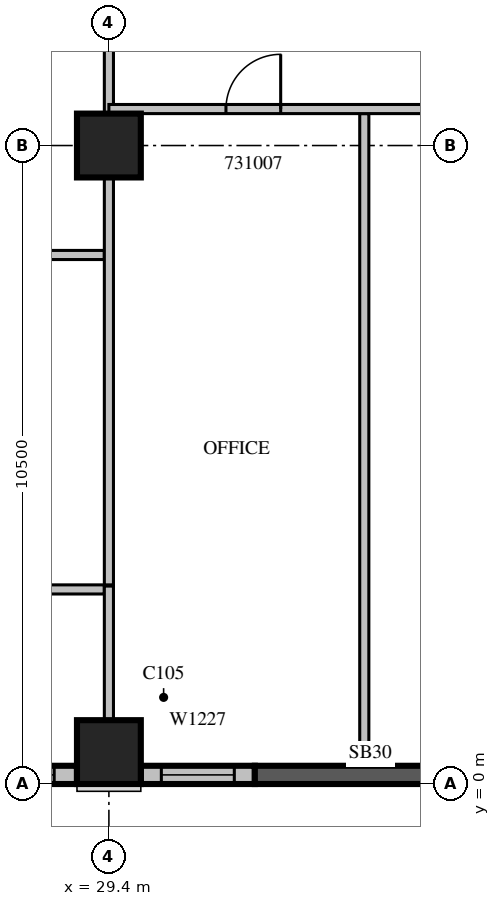
"""IFC4 building model, lengths in metres.
Left out: names, types, materials, properties, quantities, classifications, styles, units other than length and angle.
Written with IfcOpenShell. Run it as: python <this file> out.ifc"""

import sys

from ifc_helpers import new_model, si_unit, direction, frame, frame_2d, origin, origin_2d, place, context, subcontext, project, spatial, rectangle, extrude, source, transform, mapped, element, fill, save


model = new_model("IFC4")
c1 = context("Model", 3, precision=1e-05, world=origin(), true_north=direction((0.0, 1.0)))
c2 = subcontext(c1, "Body", "Model", "MODEL_VIEW")
j1 = project(units=[si_unit("LENGTHUNIT", "METRE"), si_unit("PLANEANGLEUNIT", "RADIAN")], contexts=[c1])
p1 = place(None, origin())
s1 = spatial("IfcSite", under=j1, at=p1, CompositionType="ELEMENT")
p2 = place(p1, origin())
s2 = spatial("IfcBuilding", under=s1, at=p2, CompositionType="ELEMENT")
p3 = place(p2, frame((0.0, 0.0, 141.3)))
s3 = spatial("IfcBuildingStorey", under=s2, at=p3, CompositionType="ELEMENT", Elevation=141.3)
m1 = source(origin(), c2, "Body", "SweptSolid", [
    extrude(rectangle(XDim=1.05, YDim=1.05, at=origin_2d()), origin(), (0.0, 0.0, 1.0), 4.2),
])
for number, where, z_axis, x_axis in (
    (1, (29.4, 0.525, 0.0), (0.0, 0.0, 1.0), (1.0, 0.0, 0.0)),
    (2, (29.4, 10.5, 0.0), (0.0, 0.0, 1.0), (1.0, 0.0, 0.0)),
):
    element("IfcColumn", number, at=place(p3, frame(where, z_axis=z_axis, x_axis=x_axis)), inside=s3, PredefinedType="COLUMN", context=c2, shape_type="MappedRepresentation", body=[
        mapped(m1, transform((0.0, 0.0, 0.0), scale=1.0)),
    ])
m2 = source(origin(), c2, "Body", "SweptSolid", [
    extrude(rectangle(XDim=7.35, YDim=0.3, at=frame_2d((3.675, 0.0))), origin(), (0.0, 0.0, 1.0), 3.8),
])
p4 = place(p3, frame((21.525, 0.15, 0.0), z_axis=(0.0, 0.0, 1.0), x_axis=(1.0, 0.0, 0.0)))
e3 = element("IfcWall", 3, at=p4, inside=s3, PredefinedType="STANDARD", context=c2, shape_type="MappedRepresentation", body=[
    mapped(m2, transform((0.0, 0.0, 0.0), scale=1.0)),
])
m3 = source(origin(), c2, "Body", "SweptSolid", [
    extrude(rectangle(XDim=2.4, YDim=2.7, at=frame_2d((1.2, 1.35))), frame((0.0, 0.16, 0.0), z_axis=(0.0, -1.0, 0.0), x_axis=(1.0, 0.0, 0.0)), (0.0, 0.0, 1.0), 0.32),
])
p5 = place(p4, frame((0.375, 0.0, 0.6)))
e4 = element("IfcOpeningElement", 4, at=p5, cuts=e3, PredefinedType="OPENING", context=c2, shape_type="MappedRepresentation", body=[
    mapped(m3, transform((0.0, 0.0, 0.0), scale=1.0)),
])
p6 = place(p4, frame((4.575, 0.0, 0.6)))
e5 = element("IfcOpeningElement", 5, at=p6, cuts=e3, PredefinedType="OPENING", context=c2, shape_type="MappedRepresentation", body=[
    mapped(m3, transform((0.0, 0.0, 0.0), scale=1.0)),
])
m4 = source(origin(), c2, "Body", "SweptSolid", [
    extrude(rectangle(XDim=1.875, YDim=0.3, at=frame_2d((0.938, 0.0))), origin(), (0.0, 0.0, 1.0), 3.8),
])
p7 = place(p3, frame((29.925, 0.15, 0.0), z_axis=(0.0, 0.0, 1.0), x_axis=(1.0, 0.0, 0.0)))
e6 = element("IfcWall", 6, at=p7, inside=s3, PredefinedType="STANDARD", context=c2, shape_type="MappedRepresentation", body=[
    mapped(m4, transform((0.0, 0.0, 0.0), scale=1.0)),
])
m5 = source(origin(), c2, "Body", "SweptSolid", [
    extrude(rectangle(XDim=1.2, YDim=2.7, at=frame_2d((0.6, 1.35))), frame((0.0, 0.16, 0.0), z_axis=(0.0, -1.0, 0.0), x_axis=(1.0, 0.0, 0.0)), (0.0, 0.0, 1.0), 0.32),
])
p8 = place(p7, frame((0.338, 0.0, 0.6)))
e7 = element("IfcOpeningElement", 7, at=p8, cuts=e6, PredefinedType="OPENING", context=c2, shape_type="MappedRepresentation", body=[
    mapped(m5, transform((0.0, 0.0, 0.0), scale=1.0)),
])
m6 = source(origin(), c2, "Body", "SweptSolid", [
    extrude(rectangle(XDim=3.8, YDim=0.3, at=frame_2d((1.9, 0.0))), origin(), (0.0, 0.0, 1.0), 3.8),
])
p9 = place(p3, frame((31.8, 0.15, 0.0), z_axis=(0.0, 0.0, 1.0), x_axis=(1.0, 0.0, 0.0)))
e8 = element("IfcWall", 8, at=p9, inside=s3, PredefinedType="SOLIDWALL", context=c2, shape_type="MappedRepresentation", body=[
    mapped(m6, transform((0.0, 0.0, 0.0), scale=1.0)),
])
p10 = place(p3, frame((29.325, 8.7, 0.0), z_axis=(0.0, 0.0, 1.0), x_axis=(-1.0, 0.0, 0.0)))
e9 = element("IfcWall", 9, at=p10, inside=s3, PredefinedType="PARTITIONING", context=c2, shape_type="SweptSolid", body=[
    extrude(rectangle(XDim=5.35, YDim=0.15, at=frame_2d((2.675, 0.0))), origin(), (0.0, 0.0, 1.0), 3.8),
])
m7 = source(origin(), c2, "Body", "SweptSolid", [
    extrude(rectangle(XDim=6.701, YDim=0.15, at=frame_2d((3.35, 0.0))), origin(), (0.0, 0.0, 1.0), 3.8),
])
p11 = place(p3, frame((29.4, 3.275, 0.0), z_axis=(0.0, 0.0, 1.0), x_axis=(0.0, 1.0, 0.0)))
e10 = element("IfcWall", 10, at=p11, inside=s3, PredefinedType="PARTITIONING", context=c2, shape_type="MappedRepresentation", body=[
    mapped(m7, transform((0.0, 0.0, 0.0), scale=1.0)),
])
m8 = source(origin(), c2, "Body", "SweptSolid", [
    extrude(rectangle(XDim=3.976, YDim=0.15, at=frame_2d((1.988, 0.0))), origin(), (0.0, 0.0, 1.0), 3.8),
])
p12 = place(p3, frame((29.4, 11.024, 0.0), z_axis=(0.0, 0.0, 1.0), x_axis=(0.0, 1.0, 0.0)))
e11 = element("IfcWall", 11, at=p12, inside=s3, PredefinedType="PARTITIONING", context=c2, shape_type="MappedRepresentation", body=[
    mapped(m8, transform((0.0, 0.0, 0.0), scale=1.0)),
])
m9 = source(origin(), c2, "Body", "SweptSolid", [
    extrude(rectangle(XDim=7.325, YDim=0.15, at=frame_2d((3.663, 0.0))), origin(), (0.0, 0.0, 1.0), 3.8),
])
p13 = place(p3, frame((22.0, 3.2, 0.0), z_axis=(0.0, 0.0, 1.0), x_axis=(1.0, 0.0, 0.0)))
e12 = element("IfcWall", 12, at=p13, inside=s3, PredefinedType="PARTITIONING", context=c2, shape_type="MappedRepresentation", body=[
    mapped(m9, transform((0.0, 0.0, 0.0), scale=1.0)),
])
m10 = source(origin(), c2, "Body", "SweptSolid", [
    extrude(rectangle(XDim=1.0, YDim=2.1, at=frame_2d((0.5, 1.05))), frame((0.0, 0.085, 0.0), z_axis=(0.0, -1.0, 0.0), x_axis=(1.0, 0.0, 0.0)), (0.0, 0.0, 1.0), 0.17),
])
p14 = place(p13, frame((3.2, 0.0, 0.0)))
e13 = element("IfcOpeningElement", 13, at=p14, cuts=e12, PredefinedType="OPENING", context=c2, shape_type="MappedRepresentation", body=[
    mapped(m10, transform((0.0, 0.0, 0.0), scale=1.0)),
])
m11 = source(origin(), c2, "Body", "SweptSolid", [
    extrude(rectangle(XDim=0.9, YDim=2.1, at=frame_2d((0.45, 1.05))), frame((0.0, 0.085, 0.0), z_axis=(0.0, -1.0, 0.0), x_axis=(1.0, 0.0, 0.0)), (0.0, 0.0, 1.0), 0.17),
])
p15 = place(p13, frame((2.213, 0.0, 0.0)))
e14 = element("IfcOpeningElement", 14, at=p15, cuts=e12, PredefinedType="OPENING", context=c2, shape_type="MappedRepresentation", body=[
    mapped(m11, transform((0.0, 0.0, 0.0), scale=1.0)),
])
m12 = source(origin(), c2, "Body", "SweptSolid", [
    extrude(rectangle(XDim=10.725, YDim=0.15, at=frame_2d((5.362, 0.0))), origin(), (0.0, 0.0, 1.0), 3.8),
])
p16 = place(p3, frame((33.6, 0.3, 0.0), z_axis=(0.0, 0.0, 1.0), x_axis=(0.0, 1.0, 0.0)))
e15 = element("IfcWall", 15, at=p16, inside=s3, PredefinedType="PARTITIONING", context=c2, shape_type="MappedRepresentation", body=[
    mapped(m12, transform((0.0, 0.0, 0.0), scale=1.0)),
])
m13 = source(origin(), c2, "Body", "SweptSolid", [
    extrude(rectangle(XDim=2.206, YDim=0.15, at=frame_2d((1.103, 0.0))), origin(), (0.0, 0.0, 1.0), 3.8),
])
p17 = place(p3, frame((29.4, 1.049, 0.0), z_axis=(0.0, 0.0, 1.0), x_axis=(0.0, 1.0, 0.0)))
e16 = element("IfcWall", 16, at=p17, inside=s3, PredefinedType="PARTITIONING", context=c2, shape_type="MappedRepresentation", body=[
    mapped(m13, transform((0.0, 0.0, 0.0), scale=1.0)),
])
m14 = source(origin(), c2, "Body", "SweptSolid", [
    extrude(rectangle(XDim=8.4, YDim=0.15, at=frame_2d((4.2, 0.0))), origin(), (0.0, 0.0, 1.0), 3.8),
])
p18 = place(p3, frame((37.8, 11.1, 0.0), z_axis=(0.0, 0.0, 1.0), x_axis=(-1.0, 0.0, 0.0)))
e17 = element("IfcWall", 17, at=p18, inside=s3, PredefinedType="PARTITIONING", context=c2, shape_type="MappedRepresentation", body=[
    mapped(m14, transform((0.0, 0.0, 0.0), scale=1.0)),
])
p19 = place(p18, frame((5.575, 0.0, 0.0)))
e18 = element("IfcOpeningElement", 18, at=p19, cuts=e17, PredefinedType="OPENING", context=c2, shape_type="MappedRepresentation", body=[
    mapped(m11, transform((0.0, 0.0, 0.0), scale=1.0)),
])
p20 = place(p18, frame((1.875, 0.0, 0.0)))
e19 = element("IfcOpeningElement", 19, at=p20, cuts=e17, PredefinedType="OPENING", context=c2, shape_type="MappedRepresentation", body=[
    mapped(m11, transform((0.0, 0.0, 0.0), scale=1.0)),
])
m15 = source(origin(), c2, "Body", "SweptSolid", [
    extrude(rectangle(XDim=2.4, YDim=2.7, at=frame_2d((1.2, 1.35))), frame((0.0, 0.03, 0.0), z_axis=(0.0, -1.0, 0.0), x_axis=(1.0, 0.0, 0.0)), (0.0, 0.0, 1.0), 0.06),
])
p21 = place(p6, origin())
e20 = element("IfcWindow", 20, at=p21, inside=s3, PartitioningType="SINGLE_PANEL", PredefinedType="WINDOW", context=c2, shape_type="MappedRepresentation", body=[
    mapped(m15, transform((0.0, 0.0, 0.0), scale=1.0)),
])
fill(e5, e20)
m16 = source(origin(), c2, "Body", "SweptSolid", [
    extrude(rectangle(XDim=1.2, YDim=2.7, at=frame_2d((0.6, 1.35))), frame((0.0, 0.03, 0.0), z_axis=(0.0, -1.0, 0.0), x_axis=(1.0, 0.0, 0.0)), (0.0, 0.0, 1.0), 0.06),
])
p22 = place(p8, origin())
e21 = element("IfcWindow", 21, at=p22, inside=s3, PartitioningType="SINGLE_PANEL", PredefinedType="WINDOW", context=c2, shape_type="MappedRepresentation", body=[
    mapped(m16, transform((0.0, 0.0, 0.0), scale=1.0)),
])
fill(e7, e21)
m17 = source(origin(), c2, "Body", "SweptSolid", [
    extrude(rectangle(XDim=0.9, YDim=2.1, at=frame_2d((0.45, 1.05))), frame((0.0, 0.025, 0.0), z_axis=(0.0, -1.0, 0.0), x_axis=(1.0, 0.0, 0.0)), (0.0, 0.0, 1.0), 0.05),
])
p23 = place(p19, origin())
e22 = element("IfcDoor", 22, at=p23, inside=s3, OperationType="SINGLE_SWING_RIGHT", PredefinedType="DOOR", context=c2, shape_type="MappedRepresentation", body=[
    mapped(m17, transform((0.0, 0.0, 0.0), scale=1.0)),
])
fill(e18, e22)
save(model, sys.argv[1])
